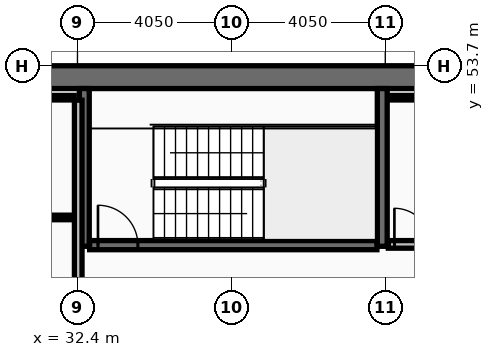
"""IFC4 building model, lengths in metres.
Left out: names, types, materials, properties, quantities, classifications, styles, units other than length and angle.
Written with IfcOpenShell. Run it as: python <this file> out.ifc"""

import sys

from ifc_helpers import new_model, si_unit, direction, frame, frame_2d, origin, place, context, subcontext, project, spatial, rectangle, extrude, element, fill, save


model = new_model("IFC4")
c1 = context("Model", 3, precision=1e-05, world=origin(), true_north=direction((0.0, 1.0)))
c2 = subcontext(c1, "Body", "Model", "MODEL_VIEW")
j1 = project(units=[si_unit("LENGTHUNIT", "METRE"), si_unit("PLANEANGLEUNIT", "RADIAN")], contexts=[c1])
p1 = place(None, origin())
s1 = spatial("IfcSite", under=j1, at=p1, CompositionType="ELEMENT")
p2 = place(p1, origin())
s2 = spatial("IfcBuilding", under=s1, at=p2, CompositionType="ELEMENT")
p3 = place(p2, frame((0.0, 0.0, 192.2)))
s3 = spatial("IfcBuildingStorey", under=s2, at=p3, CompositionType="ELEMENT", Elevation=192.2)
p4 = place(p3, frame((16.2, 53.4, 0.0), z_axis=(0.0, 0.0, 1.0), x_axis=(1.0, 0.0, 0.0)))
e1 = element("IfcWall", 1, at=p4, inside=s3, PredefinedType="SHEAR", context=c2, shape_type="SweptSolid", body=[
    extrude(rectangle(XDim=40.5, YDim=0.6, at=frame_2d((20.25, 0.0))), origin(), (0.0, 0.0, 1.0), 3.44),
])
for number, where, z_axis, x_axis in (
    (2, (32.58, 48.95, 0.0), (0.0, 0.0, 1.0), (0.0, 1.0, 0.0)),
    (3, (40.42, 48.95, 0.0), (0.0, 0.0, 1.0), (0.0, 1.0, 0.0)),
):
    element("IfcWall", number, at=place(p3, frame(where, z_axis=z_axis, x_axis=x_axis)), inside=s3, PredefinedType="SHEAR", context=c2, shape_type="SweptSolid", body=[
        extrude(rectangle(XDim=4.15, YDim=0.26, at=frame_2d((2.075, 0.0))), origin(), (0.0, 0.0, 1.0), 3.44),
    ])
p5 = place(p3, frame((32.72, 48.98, 0.0), z_axis=(0.0, 0.0, 1.0), x_axis=(1.0, 0.0, 0.0)))
e4 = element("IfcWall", 4, at=p5, inside=s3, PredefinedType="SHEAR", context=c2, shape_type="SweptSolid", body=[
    extrude(rectangle(XDim=7.56, YDim=0.24, at=frame_2d((3.78, 0.0))), origin(), (0.0, 0.0, 1.0), 3.44),
])
p6 = place(p5, frame((0.22, 0.0, 0.0)))
e5 = element("IfcOpeningElement", 5, at=p6, cuts=e4, PredefinedType="OPENING", context=c2, shape_type="SweptSolid", body=[
    extrude(rectangle(XDim=1.05, YDim=2.15, at=frame_2d((0.525, 1.075))), frame((0.0, 0.13, 0.0), z_axis=(0.0, -1.0, 0.0), x_axis=(1.0, 0.0, 0.0)), (0.0, 0.0, 1.0), 0.26),
])
p7 = place(p3, frame((32.42, 46.805, 0.0), z_axis=(0.0, 0.0, 1.0), x_axis=(0.0, 1.0, 0.0)))
e6 = element("IfcWall", 6, at=p7, inside=s3, PredefinedType="PARTITIONING", context=c2, shape_type="SweptSolid", body=[
    extrude(rectangle(XDim=5.99, YDim=0.2, at=frame_2d((2.995, 0.0))), origin(), (0.0, 0.0, 1.0), 3.44),
])
p8 = place(p3, frame((24.805, 52.86, 0.0), z_axis=(0.0, 0.0, 1.0), x_axis=(1.0, 0.0, 0.0)))
e7 = element("IfcWall", 7, at=p8, inside=s3, PredefinedType="PARTITIONING", context=c2, shape_type="SweptSolid", body=[
    extrude(rectangle(XDim=7.51, YDim=0.12, at=frame_2d((3.755, 0.0))), origin(), (0.0, 0.0, 1.0), 3.44),
])
p9 = place(p3, frame((24.805, 49.709, 0.0), z_axis=(0.0, 0.0, 1.0), x_axis=(1.0, 0.0, 0.0)))
e8 = element("IfcWall", 8, at=p9, inside=s3, PredefinedType="PARTITIONING", context=c2, shape_type="SweptSolid", body=[
    extrude(rectangle(XDim=7.51, YDim=0.12, at=frame_2d((3.755, 0.0))), origin(), (0.0, 0.0, 1.0), 3.44),
])
p10 = place(p9, frame((2.4, 0.0, 0.0)))
e9 = element("IfcOpeningElement", 9, at=p10, cuts=e8, PredefinedType="OPENING", context=c2, shape_type="SweptSolid", body=[
    extrude(rectangle(XDim=0.9, YDim=2.05, at=frame_2d((0.45, 1.025))), frame((0.0, 0.07, 0.0), z_axis=(0.0, -1.0, 0.0), x_axis=(1.0, 0.0, 0.0)), (0.0, 0.0, 1.0), 0.14),
])
p11 = place(p3, frame((40.58, 52.86, 0.0), z_axis=(0.0, 0.0, 1.0), x_axis=(1.0, 0.0, 0.0)))
e10 = element("IfcWall", 10, at=p11, inside=s3, PredefinedType="PARTITIONING", context=c2, shape_type="SweptSolid", body=[
    extrude(rectangle(XDim=7.56, YDim=0.12, at=frame_2d((3.78, 0.0))), origin(), (0.0, 0.0, 1.0), 3.44),
])
p12 = place(p3, frame((40.58, 49.0, 0.0), z_axis=(0.0, 0.0, 1.0), x_axis=(1.0, 0.0, 0.0)))
e11 = element("IfcWall", 11, at=p12, inside=s3, PredefinedType="PARTITIONING", context=c2, shape_type="SweptSolid", body=[
    extrude(rectangle(XDim=7.56, YDim=0.2, at=frame_2d((3.78, 0.0))), origin(), (0.0, 0.0, 1.0), 3.44),
])
p13 = place(p12, frame((0.16, 0.0, 0.0)))
e12 = element("IfcOpeningElement", 12, at=p13, cuts=e11, PredefinedType="OPENING", context=c2, shape_type="SweptSolid", body=[
    extrude(rectangle(XDim=0.95, YDim=2.1, at=frame_2d((0.475, 1.05))), frame((0.0, 0.11, 0.0), z_axis=(0.0, -1.0, 0.0), x_axis=(1.0, 0.0, 0.0)), (0.0, 0.0, 1.0), 0.22),
])
p14 = place(p6, origin())
e13 = element("IfcDoor", 13, at=p14, inside=s3, OperationType="SINGLE_SWING_LEFT", PredefinedType="DOOR", context=c2, shape_type="SweptSolid", body=[
    extrude(rectangle(XDim=1.05, YDim=2.15, at=frame_2d((0.525, 1.075))), frame((0.0, 0.025, 0.0), z_axis=(0.0, -1.0, 0.0), x_axis=(1.0, 0.0, 0.0)), (0.0, 0.0, 1.0), 0.05),
])
fill(e5, e13)
p15 = place(p13, origin())
e14 = element("IfcDoor", 14, at=p15, inside=s3, OperationType="SINGLE_SWING_LEFT", PredefinedType="DOOR", context=c2, shape_type="SweptSolid", body=[
    extrude(rectangle(XDim=0.95, YDim=2.1, at=frame_2d((0.475, 1.05))), frame((0.0, 0.025, 0.0), z_axis=(0.0, -1.0, 0.0), x_axis=(1.0, 0.0, 0.0)), (0.0, 0.0, 1.0), 0.05),
])
fill(e12, e14)
save(model, sys.argv[1])
